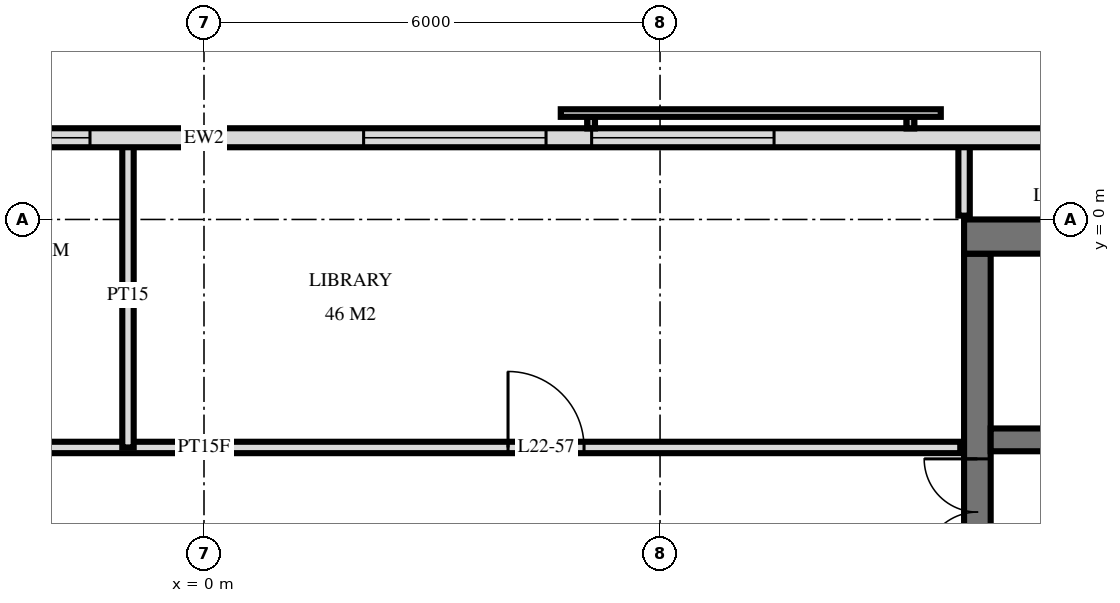
"""IFC4 building model, lengths in metres.
Left out: names, types, materials, properties, quantities, classifications, styles, units other than length and angle.
Written with IfcOpenShell. Run it as: python <this file> out.ifc"""

import sys

from ifc_helpers import new_model, si_unit, direction, frame, frame_2d, origin, place, context, subcontext, project, spatial, rectangle, extrude, element, fill, save


model = new_model("IFC4")
c1 = context("Model", 3, precision=1e-05, world=origin(), true_north=direction((0.0, 1.0)))
c2 = subcontext(c1, "Body", "Model", "MODEL_VIEW")
j1 = project(units=[si_unit("LENGTHUNIT", "METRE"), si_unit("PLANEANGLEUNIT", "RADIAN")], contexts=[c1])
p1 = place(None, origin())
s1 = spatial("IfcSite", under=j1, at=p1, CompositionType="ELEMENT")
p2 = place(p1, origin())
s2 = spatial("IfcBuilding", under=s1, at=p2, CompositionType="ELEMENT")
p3 = place(p2, frame((0.0, 0.0, 88.8)))
s3 = spatial("IfcBuildingStorey", under=s2, at=p3, CompositionType="ELEMENT", Elevation=88.8)
p4 = place(p3, frame((10.0, -0.225, 0.0), z_axis=(0.0, 0.0, 1.0), x_axis=(1.0, 0.0, 0.0)))
e1 = element("IfcWall", 1, at=p4, inside=s3, PredefinedType="SHEAR", context=c2, shape_type="SweptSolid", body=[
    extrude(rectangle(XDim=19.5, YDim=0.45, at=frame_2d((9.75, 0.0))), origin(), (0.0, 0.0, 1.0), 3.6),
])
p5 = place(p3, frame((10.175, -14.55, 0.0), z_axis=(0.0, 0.0, 1.0), x_axis=(0.0, 1.0, 0.0)))
e2 = element("IfcWall", 2, at=p5, inside=s3, PredefinedType="SHEAR", context=c2, shape_type="SweptSolid", body=[
    extrude(rectangle(XDim=14.1, YDim=0.35, at=frame_2d((7.05, 0.0))), origin(), (0.0, 0.0, 1.0), 3.6),
])
p6 = place(p5, frame((8.4, 0.0, 0.0)))
e3 = element("IfcOpeningElement", 3, at=p6, cuts=e2, PredefinedType="OPENING", context=c2, shape_type="SweptSolid", body=[
    extrude(rectangle(XDim=1.4, YDim=2.4, at=frame_2d((0.7, 1.2))), frame((0.0, 0.185, 0.0), z_axis=(0.0, -1.0, 0.0), x_axis=(1.0, 0.0, 0.0)), (0.0, 0.0, 1.0), 0.37),
])
p7 = place(p5, frame((10.0, 0.0, 0.0)))
e4 = element("IfcOpeningElement", 4, at=p7, cuts=e2, PredefinedType="OPENING", context=c2, shape_type="SweptSolid", body=[
    extrude(rectangle(XDim=1.4, YDim=2.4, at=frame_2d((0.7, 1.2))), frame((0.0, 0.185, 0.0), z_axis=(0.0, -1.0, 0.0), x_axis=(1.0, 0.0, 0.0)), (0.0, 0.0, 1.0), 0.37),
])
p8 = place(p5, frame((4.0, 0.0, 0.0)))
e5 = element("IfcOpeningElement", 5, at=p8, cuts=e2, PredefinedType="OPENING", context=c2, shape_type="SweptSolid", body=[
    extrude(rectangle(XDim=1.2, YDim=2.1, at=frame_2d((0.6, 1.05))), frame((0.0, 0.185, 0.0), z_axis=(0.0, -1.0, 0.0), x_axis=(1.0, 0.0, 0.0)), (0.0, 0.0, 1.0), 0.37),
])
p9 = place(p3, frame((10.35, -2.9, 0.0), z_axis=(0.0, 0.0, 1.0), x_axis=(1.0, 0.0, 0.0)))
e6 = element("IfcWall", 6, at=p9, inside=s3, PredefinedType="SHEAR", context=c2, shape_type="SweptSolid", body=[
    extrude(rectangle(XDim=18.7, YDim=0.3, at=frame_2d((9.35, 0.0))), origin(), (0.0, 0.0, 1.0), 3.6),
])
p10 = place(p9, frame((14.65, 0.0, 0.0)))
e7 = element("IfcOpeningElement", 7, at=p10, cuts=e6, PredefinedType="OPENING", context=c2, shape_type="SweptSolid", body=[
    extrude(rectangle(XDim=1.1, YDim=2.1, at=frame_2d((0.55, 1.05))), frame((0.0, 0.16, 0.0), z_axis=(0.0, -1.0, 0.0), x_axis=(1.0, 0.0, 0.0)), (0.0, 0.0, 1.0), 0.32),
])
p11 = place(p9, frame((17.05, 0.0, 0.0)))
e8 = element("IfcOpeningElement", 8, at=p11, cuts=e6, PredefinedType="OPENING", context=c2, shape_type="SweptSolid", body=[
    extrude(rectangle(XDim=1.1, YDim=2.1, at=frame_2d((0.55, 1.05))), frame((0.0, 0.16, 0.0), z_axis=(0.0, -1.0, 0.0), x_axis=(1.0, 0.0, 0.0)), (0.0, 0.0, 1.0), 0.32),
])
p12 = place(p9, frame((6.9, 0.0, 0.0)))
e9 = element("IfcOpeningElement", 9, at=p12, cuts=e6, PredefinedType="OPENING", context=c2, shape_type="SweptSolid", body=[
    extrude(rectangle(XDim=0.9, YDim=2.1, at=frame_2d((0.45, 1.05))), frame((0.0, 0.16, 0.0), z_axis=(0.0, -1.0, 0.0), x_axis=(1.0, 0.0, 0.0)), (0.0, 0.0, 1.0), 0.32),
])
p13 = place(p9, frame((0.85, 0.0, 0.0)))
e10 = element("IfcOpeningElement", 10, at=p13, cuts=e6, PredefinedType="OPENING", context=c2, shape_type="SweptSolid", body=[
    extrude(rectangle(XDim=1.0, YDim=2.1, at=frame_2d((0.5, 1.05))), frame((0.0, 0.16, 0.0), z_axis=(0.0, -1.0, 0.0), x_axis=(1.0, 0.0, 0.0)), (0.0, 0.0, 1.0), 0.32),
])
p14 = place(p9, frame((3.387, 0.0, 0.0)))
e11 = element("IfcOpeningElement", 11, at=p14, cuts=e6, PredefinedType="OPENING", context=c2, shape_type="SweptSolid", body=[
    extrude(rectangle(XDim=1.0, YDim=2.1, at=frame_2d((0.5, 1.05))), frame((0.0, 0.16, 0.0), z_axis=(0.0, -1.0, 0.0), x_axis=(1.0, 0.0, 0.0)), (0.0, 0.0, 1.0), 0.32),
])
p15 = place(p9, frame((4.812, 0.0, 0.0)))
e12 = element("IfcOpeningElement", 12, at=p15, cuts=e6, PredefinedType="OPENING", context=c2, shape_type="SweptSolid", body=[
    extrude(rectangle(XDim=1.0, YDim=2.1, at=frame_2d((0.5, 1.05))), frame((0.0, 0.16, 0.0), z_axis=(0.0, -1.0, 0.0), x_axis=(1.0, 0.0, 0.0)), (0.0, 0.0, 1.0), 0.32),
])
p16 = place(p9, frame((12.1, 0.0, 0.0)))
e13 = element("IfcOpeningElement", 13, at=p16, cuts=e6, PredefinedType="OPENING", context=c2, shape_type="SweptSolid", body=[
    extrude(rectangle(XDim=1.0, YDim=2.1, at=frame_2d((0.5, 1.05))), frame((0.0, 0.16, 0.0), z_axis=(0.0, -1.0, 0.0), x_axis=(1.0, 0.0, 0.0)), (0.0, 0.0, 1.0), 0.32),
])
p17 = place(p3, frame((28.775, 1.075, 0.0), z_axis=(0.0, 0.0, 1.0), x_axis=(-1.0, 0.0, 0.0)))
e14 = element("IfcWall", 14, at=p17, inside=s3, PredefinedType="SOLIDWALL", context=c2, shape_type="SweptSolid", body=[
    extrude(rectangle(XDim=57.551, YDim=0.25, at=frame_2d((28.775, 0.0))), origin(), (0.0, 0.0, 1.0), 3.32),
])
p18 = place(p17, frame((21.275, 0.0, 0.3)))
e15 = element("IfcOpeningElement", 15, at=p18, cuts=e14, PredefinedType="OPENING", context=c2, shape_type="SweptSolid", body=[
    extrude(rectangle(XDim=2.4, YDim=2.1, at=frame_2d((1.2, 1.05))), frame((0.0, 0.135, 0.0), z_axis=(0.0, -1.0, 0.0), x_axis=(1.0, 0.0, 0.0)), (0.0, 0.0, 1.0), 0.27),
])
p19 = place(p17, frame((24.275, 0.0, 0.3)))
e16 = element("IfcOpeningElement", 16, at=p19, cuts=e14, PredefinedType="OPENING", context=c2, shape_type="SweptSolid", body=[
    extrude(rectangle(XDim=2.4, YDim=2.1, at=frame_2d((1.2, 1.05))), frame((0.0, 0.135, 0.0), z_axis=(0.0, -1.0, 0.0), x_axis=(1.0, 0.0, 0.0)), (0.0, 0.0, 1.0), 0.27),
])
p20 = place(p17, frame((30.275, 0.0, 0.3)))
e17 = element("IfcOpeningElement", 17, at=p20, cuts=e14, PredefinedType="OPENING", context=c2, shape_type="SweptSolid", body=[
    extrude(rectangle(XDim=2.4, YDim=2.1, at=frame_2d((1.2, 1.05))), frame((0.0, 0.135, 0.0), z_axis=(0.0, -1.0, 0.0), x_axis=(1.0, 0.0, 0.0)), (0.0, 0.0, 1.0), 0.27),
])
p21 = place(p3, frame((10.0, 0.05, 0.0), z_axis=(0.0, 0.0, 1.0), x_axis=(0.0, 1.0, 0.0)))
e18 = element("IfcWall", 18, at=p21, inside=s3, PredefinedType="PARTITIONING", context=c2, shape_type="SweptSolid", body=[
    extrude(rectangle(XDim=0.97, YDim=0.15, at=frame_2d((0.485, 0.0))), origin(), (0.0, 0.0, 1.0), 3.32),
])
p22 = place(p3, frame((-1.0, -3.0, 0.0), z_axis=(0.0, 0.0, 1.0), x_axis=(0.0, 1.0, 0.0)))
e19 = element("IfcWall", 19, at=p22, inside=s3, PredefinedType="PARTITIONING", context=c2, shape_type="SweptSolid", body=[
    extrude(rectangle(XDim=4.02, YDim=0.15, at=frame_2d((2.01, 0.0))), origin(), (0.0, 0.0, 1.0), 3.32),
])
p23 = place(p3, frame((-9.95, -3.0, 0.0), z_axis=(0.0, 0.0, 1.0), x_axis=(1.0, 0.0, 0.0)))
e20 = element("IfcWall", 20, at=p23, inside=s3, PredefinedType="PARTITIONING", context=c2, shape_type="SweptSolid", body=[
    extrude(rectangle(XDim=19.9, YDim=0.15, at=frame_2d((9.95, 0.0))), origin(), (0.0, 0.0, 1.0), 3.32),
])
p24 = place(p23, frame((0.95, 0.0, 0.0)))
e21 = element("IfcOpeningElement", 21, at=p24, cuts=e20, PredefinedType="OPENING", context=c2, shape_type="SweptSolid", body=[
    extrude(rectangle(XDim=1.0, YDim=2.1, at=frame_2d((0.5, 1.05))), frame((0.0, 0.085, 0.0), z_axis=(0.0, -1.0, 0.0), x_axis=(1.0, 0.0, 0.0)), (0.0, 0.0, 1.0), 0.17),
])
p25 = place(p23, frame((3.7, 0.0, 0.0)))
e22 = element("IfcOpeningElement", 22, at=p25, cuts=e20, PredefinedType="OPENING", context=c2, shape_type="SweptSolid", body=[
    extrude(rectangle(XDim=1.0, YDim=2.1, at=frame_2d((0.5, 1.05))), frame((0.0, 0.085, 0.0), z_axis=(0.0, -1.0, 0.0), x_axis=(1.0, 0.0, 0.0)), (0.0, 0.0, 1.0), 0.17),
])
p26 = place(p23, frame((6.7, 0.0, 0.0)))
e23 = element("IfcOpeningElement", 23, at=p26, cuts=e20, PredefinedType="OPENING", context=c2, shape_type="SweptSolid", body=[
    extrude(rectangle(XDim=1.0, YDim=2.1, at=frame_2d((0.5, 1.05))), frame((0.0, 0.085, 0.0), z_axis=(0.0, -1.0, 0.0), x_axis=(1.0, 0.0, 0.0)), (0.0, 0.0, 1.0), 0.17),
])
p27 = place(p23, frame((13.95, 0.0, 0.0)))
e24 = element("IfcOpeningElement", 24, at=p27, cuts=e20, PredefinedType="OPENING", context=c2, shape_type="SweptSolid", body=[
    extrude(rectangle(XDim=1.0, YDim=2.1, at=frame_2d((0.5, 1.05))), frame((0.0, 0.085, 0.0), z_axis=(0.0, -1.0, 0.0), x_axis=(1.0, 0.0, 0.0)), (0.0, 0.0, 1.0), 0.17),
])
p28 = place(p18, origin())
e25 = element("IfcWindow", 25, at=p28, inside=s3, PartitioningType="SINGLE_PANEL", PredefinedType="WINDOW", context=c2, shape_type="SweptSolid", body=[
    extrude(rectangle(XDim=2.4, YDim=2.1, at=frame_2d((1.2, 1.05))), frame((0.0, 0.03, 0.0), z_axis=(0.0, -1.0, 0.0), x_axis=(1.0, 0.0, 0.0)), (0.0, 0.0, 1.0), 0.06),
])
fill(e15, e25)
p29 = place(p19, origin())
e26 = element("IfcWindow", 26, at=p29, inside=s3, PartitioningType="SINGLE_PANEL", PredefinedType="WINDOW", context=c2, shape_type="SweptSolid", body=[
    extrude(rectangle(XDim=2.4, YDim=2.1, at=frame_2d((1.2, 1.05))), frame((0.0, 0.03, 0.0), z_axis=(0.0, -1.0, 0.0), x_axis=(1.0, 0.0, 0.0)), (0.0, 0.0, 1.0), 0.06),
])
fill(e16, e26)
p30 = place(p20, origin())
e27 = element("IfcWindow", 27, at=p30, inside=s3, PartitioningType="SINGLE_PANEL", PredefinedType="WINDOW", context=c2, shape_type="SweptSolid", body=[
    extrude(rectangle(XDim=2.4, YDim=2.1, at=frame_2d((1.2, 1.05))), frame((0.0, 0.03, 0.0), z_axis=(0.0, -1.0, 0.0), x_axis=(1.0, 0.0, 0.0)), (0.0, 0.0, 1.0), 0.06),
])
fill(e17, e27)
p31 = place(p7, origin())
e28 = element("IfcDoor", 28, at=p31, inside=s3, OperationType="DOUBLE_DOOR_SINGLE_SWING", PredefinedType="DOOR", context=c2, shape_type="SweptSolid", body=[
    extrude(rectangle(XDim=1.4, YDim=2.4, at=frame_2d((0.7, 1.2))), frame((0.0, 0.025, 0.0), z_axis=(0.0, -1.0, 0.0), x_axis=(1.0, 0.0, 0.0)), (0.0, 0.0, 1.0), 0.05),
])
fill(e4, e28)
p32 = place(p27, origin())
e29 = element("IfcDoor", 29, at=p32, inside=s3, OperationType="SINGLE_SWING_RIGHT", PredefinedType="DOOR", context=c2, shape_type="SweptSolid", body=[
    extrude(rectangle(XDim=1.0, YDim=2.1, at=frame_2d((0.5, 1.05))), frame((0.0, 0.025, 0.0), z_axis=(0.0, -1.0, 0.0), x_axis=(1.0, 0.0, 0.0)), (0.0, 0.0, 1.0), 0.05),
])
fill(e24, e29)
save(model, sys.argv[1])
